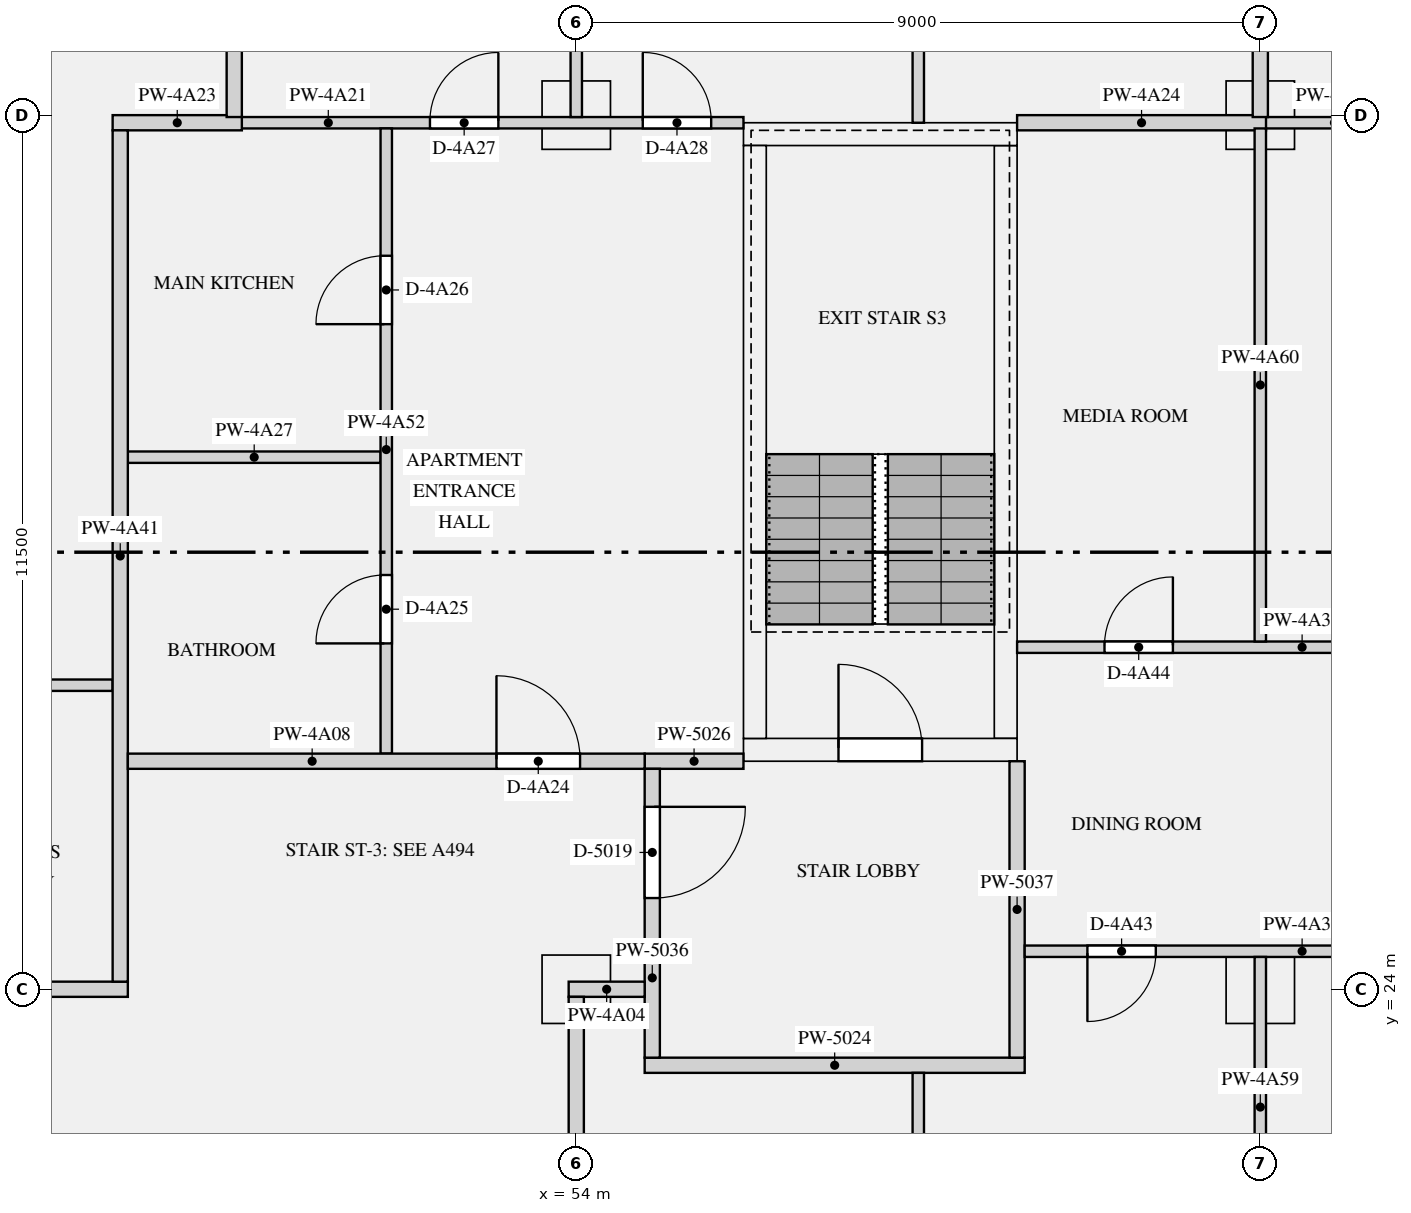
"""IFC4 building model, lengths in metres.
Left out: names, types, materials, properties, quantities, classifications, styles, units other than length and angle.
Written with IfcOpenShell. Run it as: python <this file> out.ifc"""

import sys

from ifc_helpers import new_model, si_unit, direction, frame, frame_2d, origin, origin_2d, place, context, subcontext, project, spatial, rectangle, extrude, element, fill, save


model = new_model("IFC4")
c1 = context("Model", 3, precision=1e-05, world=origin(), true_north=direction((0.0, 1.0)))
c2 = subcontext(c1, "Body", "Model", "MODEL_VIEW")
j1 = project(units=[si_unit("LENGTHUNIT", "METRE"), si_unit("PLANEANGLEUNIT", "RADIAN")], contexts=[c1])
p1 = place(None, origin())
s1 = spatial("IfcSite", under=j1, at=p1, CompositionType="ELEMENT")
p2 = place(p1, origin())
s2 = spatial("IfcBuilding", under=s1, at=p2, CompositionType="ELEMENT")
p3 = place(p2, frame((0.0, 0.0, 198.0)))
s3 = spatial("IfcBuildingStorey", under=s2, at=p3, CompositionType="ELEMENT", Elevation=198.0)
for number, where, z_axis, x_axis in (
    (1, (54.0, 24.0, 0.0), (0.0, 0.0, 1.0), (1.0, 0.0, 0.0)),
    (2, (63.0, 24.0, 0.0), (0.0, 0.0, 1.0), (1.0, 0.0, 0.0)),
    (3, (54.0, 35.5, 0.0), (0.0, 0.0, 1.0), (1.0, 0.0, 0.0)),
    (4, (63.0, 35.5, 0.0), (0.0, 0.0, 1.0), (1.0, 0.0, 0.0)),
):
    element("IfcColumn", number, at=place(p3, frame(where, z_axis=z_axis, x_axis=x_axis)), inside=s3, PredefinedType="COLUMN", context=c2, shape_type="SweptSolid", body=[
        extrude(rectangle(XDim=0.9, YDim=0.9, at=origin_2d()), origin(), (0.0, 0.0, 1.0), 3.15),
    ])
p4 = place(p3, frame((56.2, 27.15, 0.0), z_axis=(0.0, 0.0, 1.0), x_axis=(1.0, 0.0, 0.0)))
e5 = element("IfcWall", 5, at=p4, inside=s3, PredefinedType="SHEAR", context=c2, shape_type="SweptSolid", body=[
    extrude(rectangle(XDim=3.6, YDim=0.3, at=frame_2d((1.8, 0.0))), origin(), (0.0, 0.0, 1.0), 3.15),
])
p5 = place(p4, frame((1.25, 0.0, 0.0)))
e6 = element("IfcOpeningElement", 6, at=p5, cuts=e5, PredefinedType="OPENING", context=c2, shape_type="SweptSolid", body=[
    extrude(rectangle(XDim=1.1, YDim=2.1, at=frame_2d((0.55, 1.05))), frame((0.0, 0.16, 0.0), z_axis=(0.0, -1.0, 0.0), x_axis=(1.0, 0.0, 0.0)), (0.0, 0.0, 1.0), 0.32),
])
p6 = place(p3, frame((56.2, 35.25, 0.0), z_axis=(0.0, 0.0, 1.0), x_axis=(1.0, 0.0, 0.0)))
e7 = element("IfcWall", 7, at=p6, inside=s3, PredefinedType="SHEAR", context=c2, shape_type="SweptSolid", body=[
    extrude(rectangle(XDim=3.6, YDim=0.3, at=frame_2d((1.8, 0.0))), origin(), (0.0, 0.0, 1.0), 3.15),
])
for number, where, z_axis, x_axis in (
    (8, (56.35, 27.3, 0.0), (0.0, 0.0, 1.0), (0.0, 1.0, 0.0)),
    (9, (59.65, 27.3, 0.0), (0.0, 0.0, 1.0), (0.0, 1.0, 0.0)),
):
    element("IfcWall", number, at=place(p3, frame(where, z_axis=z_axis, x_axis=x_axis)), inside=s3, PredefinedType="SHEAR", context=c2, shape_type="SweptSolid", body=[
        extrude(rectangle(XDim=7.8, YDim=0.3, at=frame_2d((3.9, 0.0))), origin(), (0.0, 0.0, 1.0), 3.15),
    ])
p7 = place(p3, frame((54.9, 23.0, 0.0), z_axis=(0.0, 0.0, 1.0), x_axis=(1.0, 0.0, 0.0)))
e10 = element("IfcWall", 10, at=p7, inside=s3, PredefinedType="PARTITIONING", context=c2, shape_type="SweptSolid", body=[
    extrude(rectangle(XDim=5.0, YDim=0.2, at=frame_2d((2.5, 0.0))), origin(), (0.0, 0.0, 1.0), 2.83),
])
p8 = place(p3, frame((54.9, 27.0, 0.0), z_axis=(0.0, 0.0, 1.0), x_axis=(1.0, 0.0, 0.0)))
e11 = element("IfcWall", 11, at=p8, inside=s3, PredefinedType="PARTITIONING", context=c2, shape_type="SweptSolid", body=[
    extrude(rectangle(XDim=1.3, YDim=0.2, at=frame_2d((0.65, 0.0))), origin(), (0.0, 0.0, 1.0), 2.83),
])
p9 = place(p3, frame((55.0, 23.1, 0.0), z_axis=(0.0, 0.0, 1.0), x_axis=(0.0, 1.0, 0.0)))
e12 = element("IfcWall", 12, at=p9, inside=s3, PredefinedType="PARTITIONING", context=c2, shape_type="SweptSolid", body=[
    extrude(rectangle(XDim=3.8, YDim=0.2, at=frame_2d((1.9, 0.0))), origin(), (0.0, 0.0, 1.0), 2.83),
])
p10 = place(p9, frame((2.1, 0.0, 0.0)))
e13 = element("IfcOpeningElement", 13, at=p10, cuts=e12, PredefinedType="OPENING", context=c2, shape_type="SweptSolid", body=[
    extrude(rectangle(XDim=1.2, YDim=2.1, at=frame_2d((0.6, 1.05))), frame((0.0, 0.11, 0.0), z_axis=(0.0, -1.0, 0.0), x_axis=(1.0, 0.0, 0.0)), (0.0, 0.0, 1.0), 0.22),
])
p11 = place(p3, frame((59.8, 23.1, 0.0), z_axis=(0.0, 0.0, 1.0), x_axis=(0.0, 1.0, 0.0)))
e14 = element("IfcWall", 14, at=p11, inside=s3, PredefinedType="PARTITIONING", context=c2, shape_type="SweptSolid", body=[
    extrude(rectangle(XDim=3.9, YDim=0.2, at=frame_2d((1.95, 0.0))), origin(), (0.0, 0.0, 1.0), 2.83),
])
p12 = place(p3, frame((45.0, 24.0, 0.0), z_axis=(0.0, 0.0, 1.0), x_axis=(1.0, 0.0, 0.0)))
e15 = element("IfcWall", 15, at=p12, inside=s3, PredefinedType="PARTITIONING", context=c2, shape_type="SweptSolid", body=[
    extrude(rectangle(XDim=3.1, YDim=0.2, at=frame_2d((1.55, 0.0))), origin(), (0.0, 0.0, 1.0), 2.83),
])
p13 = place(p3, frame((53.9, 24.0, 0.0), z_axis=(0.0, 0.0, 1.0), x_axis=(1.0, 0.0, 0.0)))
e16 = element("IfcWall", 16, at=p13, inside=s3, PredefinedType="PARTITIONING", context=c2, shape_type="SweptSolid", body=[
    extrude(rectangle(XDim=1.0, YDim=0.2, at=frame_2d((0.5, 0.0))), origin(), (0.0, 0.0, 1.0), 2.83),
])
p14 = place(p3, frame((48.1, 27.0, 0.0), z_axis=(0.0, 0.0, 1.0), x_axis=(1.0, 0.0, 0.0)))
e17 = element("IfcWall", 17, at=p14, inside=s3, PredefinedType="PARTITIONING", context=c2, shape_type="SweptSolid", body=[
    extrude(rectangle(XDim=6.8, YDim=0.2, at=frame_2d((3.4, 0.0))), origin(), (0.0, 0.0, 1.0), 2.83),
])
p15 = place(p14, frame((4.85, 0.0, 0.0)))
e18 = element("IfcOpeningElement", 18, at=p15, cuts=e17, PredefinedType="OPENING", context=c2, shape_type="SweptSolid", body=[
    extrude(rectangle(XDim=1.1, YDim=2.1, at=frame_2d((0.55, 1.05))), frame((0.0, 0.11, 0.0), z_axis=(0.0, -1.0, 0.0), x_axis=(1.0, 0.0, 0.0)), (0.0, 0.0, 1.0), 0.22),
])
p16 = place(p3, frame((49.4, 35.4, 0.0), z_axis=(0.0, 0.0, 1.0), x_axis=(1.0, 0.0, 0.0)))
e19 = element("IfcWall", 19, at=p16, inside=s3, PredefinedType="PARTITIONING", context=c2, shape_type="SweptSolid", body=[
    extrude(rectangle(XDim=6.8, YDim=0.15, at=frame_2d((3.4, 0.0))), origin(), (0.0, 0.0, 1.0), 2.83),
])
p17 = place(p16, frame((2.675, 0.0, 0.0)))
e20 = element("IfcOpeningElement", 20, at=p17, cuts=e19, PredefinedType="OPENING", context=c2, shape_type="SweptSolid", body=[
    extrude(rectangle(XDim=0.9, YDim=2.1, at=frame_2d((0.45, 1.05))), frame((0.0, 0.085, 0.0), z_axis=(0.0, -1.0, 0.0), x_axis=(1.0, 0.0, 0.0)), (0.0, 0.0, 1.0), 0.17),
])
p18 = place(p16, frame((5.475, 0.0, 0.0)))
e21 = element("IfcOpeningElement", 21, at=p18, cuts=e19, PredefinedType="OPENING", context=c2, shape_type="SweptSolid", body=[
    extrude(rectangle(XDim=0.9, YDim=2.1, at=frame_2d((0.45, 1.05))), frame((0.0, 0.085, 0.0), z_axis=(0.0, -1.0, 0.0), x_axis=(1.0, 0.0, 0.0)), (0.0, 0.0, 1.0), 0.17),
])
p19 = place(p3, frame((62.925, 35.4, 0.0), z_axis=(0.0, 0.0, 1.0), x_axis=(1.0, 0.0, 0.0)))
e22 = element("IfcWall", 22, at=p19, inside=s3, PredefinedType="PARTITIONING", context=c2, shape_type="SweptSolid", body=[
    extrude(rectangle(XDim=4.65, YDim=0.15, at=frame_2d((2.325, 0.0))), origin(), (0.0, 0.0, 1.0), 2.83),
])
p20 = place(p19, frame((2.1, 0.0, 0.0)))
e23 = element("IfcOpeningElement", 23, at=p20, cuts=e22, PredefinedType="OPENING", context=c2, shape_type="SweptSolid", body=[
    extrude(rectangle(XDim=0.9, YDim=2.1, at=frame_2d((0.45, 1.05))), frame((0.0, 0.085, 0.0), z_axis=(0.0, -1.0, 0.0), x_axis=(1.0, 0.0, 0.0)), (0.0, 0.0, 1.0), 0.17),
])
p21 = place(p3, frame((47.9, 35.4, 0.0), z_axis=(0.0, 0.0, 1.0), x_axis=(1.0, 0.0, 0.0)))
e24 = element("IfcWall", 24, at=p21, inside=s3, PredefinedType="PARTITIONING", context=c2, shape_type="SweptSolid", body=[
    extrude(rectangle(XDim=1.7, YDim=0.2, at=frame_2d((0.85, 0.0))), origin(), (0.0, 0.0, 1.0), 2.83),
])
p22 = place(p3, frame((59.8, 35.4, 0.0), z_axis=(0.0, 0.0, 1.0), x_axis=(1.0, 0.0, 0.0)))
e25 = element("IfcWall", 25, at=p22, inside=s3, PredefinedType="PARTITIONING", context=c2, shape_type="SweptSolid", body=[
    extrude(rectangle(XDim=3.275, YDim=0.2, at=frame_2d((1.637, 0.0))), origin(), (0.0, 0.0, 1.0), 2.83),
])
p23 = place(p3, frame((45.0, 28.0, 0.0), z_axis=(0.0, 0.0, 1.0), x_axis=(1.0, 0.0, 0.0)))
e26 = element("IfcWall", 26, at=p23, inside=s3, PredefinedType="PARTITIONING", context=c2, shape_type="SweptSolid", body=[
    extrude(rectangle(XDim=2.9, YDim=0.15, at=frame_2d((1.45, 0.0))), origin(), (0.0, 0.0, 1.0), 2.83),
])
p24 = place(p23, frame((1.05, 0.0, 0.0)))
e27 = element("IfcOpeningElement", 27, at=p24, cuts=e26, PredefinedType="OPENING", context=c2, shape_type="SweptSolid", body=[
    extrude(rectangle(XDim=0.9, YDim=2.1, at=frame_2d((0.45, 1.05))), frame((0.0, 0.085, 0.0), z_axis=(0.0, -1.0, 0.0), x_axis=(1.0, 0.0, 0.0)), (0.0, 0.0, 1.0), 0.17),
])
p25 = place(p3, frame((48.1, 31.0, 0.0), z_axis=(0.0, 0.0, 1.0), x_axis=(1.0, 0.0, 0.0)))
e28 = element("IfcWall", 28, at=p25, inside=s3, PredefinedType="PARTITIONING", context=c2, shape_type="SweptSolid", body=[
    extrude(rectangle(XDim=3.325, YDim=0.15, at=frame_2d((1.663, 0.0))), origin(), (0.0, 0.0, 1.0), 2.83),
])
p26 = place(p3, frame((59.9, 24.5, 0.0), z_axis=(0.0, 0.0, 1.0), x_axis=(1.0, 0.0, 0.0)))
e29 = element("IfcWall", 29, at=p26, inside=s3, PredefinedType="PARTITIONING", context=c2, shape_type="SweptSolid", body=[
    extrude(rectangle(XDim=8.95, YDim=0.15, at=frame_2d((4.475, 0.0))), origin(), (0.0, 0.0, 1.0), 2.83),
])
p27 = place(p26, frame((5.575, 0.0, 0.0)))
e30 = element("IfcOpeningElement", 30, at=p27, cuts=e29, PredefinedType="OPENING", context=c2, shape_type="SweptSolid", body=[
    extrude(rectangle(XDim=1.5, YDim=2.1, at=frame_2d((0.75, 1.05))), frame((0.0, 0.085, 0.0), z_axis=(0.0, -1.0, 0.0), x_axis=(1.0, 0.0, 0.0)), (0.0, 0.0, 1.0), 0.17),
])
p28 = place(p26, frame((0.825, 0.0, 0.0)))
e31 = element("IfcOpeningElement", 31, at=p28, cuts=e29, PredefinedType="OPENING", context=c2, shape_type="SweptSolid", body=[
    extrude(rectangle(XDim=0.9, YDim=2.1, at=frame_2d((0.45, 1.05))), frame((0.0, 0.085, 0.0), z_axis=(0.0, -1.0, 0.0), x_axis=(1.0, 0.0, 0.0)), (0.0, 0.0, 1.0), 0.17),
])
p29 = place(p3, frame((59.8, 28.5, 0.0), z_axis=(0.0, 0.0, 1.0), x_axis=(1.0, 0.0, 0.0)))
e32 = element("IfcWall", 32, at=p29, inside=s3, PredefinedType="PARTITIONING", context=c2, shape_type="SweptSolid", body=[
    extrude(rectangle(XDim=9.05, YDim=0.15, at=frame_2d((4.525, 0.0))), origin(), (0.0, 0.0, 1.0), 2.83),
])
p30 = place(p29, frame((1.15, 0.0, 0.0)))
e33 = element("IfcOpeningElement", 33, at=p30, cuts=e32, PredefinedType="OPENING", context=c2, shape_type="SweptSolid", body=[
    extrude(rectangle(XDim=0.9, YDim=2.1, at=frame_2d((0.45, 1.05))), frame((0.0, 0.085, 0.0), z_axis=(0.0, -1.0, 0.0), x_axis=(1.0, 0.0, 0.0)), (0.0, 0.0, 1.0), 0.17),
])
p31 = place(p29, frame((5.45, 0.0, 0.0)))
e34 = element("IfcOpeningElement", 34, at=p31, cuts=e32, PredefinedType="OPENING", context=c2, shape_type="SweptSolid", body=[
    extrude(rectangle(XDim=1.5, YDim=2.1, at=frame_2d((0.75, 1.05))), frame((0.0, 0.085, 0.0), z_axis=(0.0, -1.0, 0.0), x_axis=(1.0, 0.0, 0.0)), (0.0, 0.0, 1.0), 0.17),
])
p32 = place(p3, frame((54.0, 35.475, 0.0), z_axis=(0.0, 0.0, 1.0), x_axis=(0.0, 1.0, 0.0)))
e35 = element("IfcWall", 35, at=p32, inside=s3, PredefinedType="PARTITIONING", context=c2, shape_type="SweptSolid", body=[
    extrude(rectangle(XDim=5.375, YDim=0.15, at=frame_2d((2.688, 0.0))), origin(), (0.0, 0.0, 1.0), 2.83),
])
p33 = place(p3, frame((54.0, 16.1, 0.0), z_axis=(0.0, 0.0, 1.0), x_axis=(0.0, 1.0, 0.0)))
e36 = element("IfcWall", 36, at=p33, inside=s3, PredefinedType="PARTITIONING", context=c2, shape_type="SweptSolid", body=[
    extrude(rectangle(XDim=7.8, YDim=0.2, at=frame_2d((3.9, 0.0))), origin(), (0.0, 0.0, 1.0), 2.83),
])
p34 = place(p33, frame((1.85, 0.0, 0.0)))
e37 = element("IfcOpeningElement", 37, at=p34, cuts=e36, PredefinedType="OPENING", context=c2, shape_type="SweptSolid", body=[
    extrude(rectangle(XDim=1.1, YDim=2.1, at=frame_2d((0.55, 1.05))), frame((0.0, 0.11, 0.0), z_axis=(0.0, -1.0, 0.0), x_axis=(1.0, 0.0, 0.0)), (0.0, 0.0, 1.0), 0.22),
])
p35 = place(p3, frame((48.0, 24.1, 0.0), z_axis=(0.0, 0.0, 1.0), x_axis=(0.0, 1.0, 0.0)))
e38 = element("IfcWall", 38, at=p35, inside=s3, PredefinedType="PARTITIONING", context=c2, shape_type="SweptSolid", body=[
    extrude(rectangle(XDim=11.2, YDim=0.2, at=frame_2d((5.6, 0.0))), origin(), (0.0, 0.0, 1.0), 2.83),
])
p36 = place(p3, frame((49.5, 35.475, 0.0), z_axis=(0.0, 0.0, 1.0), x_axis=(0.0, 1.0, 0.0)))
e39 = element("IfcWall", 39, at=p36, inside=s3, PredefinedType="PARTITIONING", context=c2, shape_type="SweptSolid", body=[
    extrude(rectangle(XDim=5.375, YDim=0.2, at=frame_2d((2.688, 0.0))), origin(), (0.0, 0.0, 1.0), 2.83),
])
p37 = place(p3, frame((51.5, 27.1, 0.0), z_axis=(0.0, 0.0, 1.0), x_axis=(0.0, 1.0, 0.0)))
e40 = element("IfcWall", 40, at=p37, inside=s3, PredefinedType="PARTITIONING", context=c2, shape_type="SweptSolid", body=[
    extrude(rectangle(XDim=8.225, YDim=0.15, at=frame_2d((4.112, 0.0))), origin(), (0.0, 0.0, 1.0), 2.83),
])
p38 = place(p37, frame((1.45, 0.0, 0.0)))
e41 = element("IfcOpeningElement", 41, at=p38, cuts=e40, PredefinedType="OPENING", context=c2, shape_type="SweptSolid", body=[
    extrude(rectangle(XDim=0.9, YDim=2.1, at=frame_2d((0.45, 1.05))), frame((0.0, 0.085, 0.0), z_axis=(0.0, -1.0, 0.0), x_axis=(1.0, 0.0, 0.0)), (0.0, 0.0, 1.0), 0.17),
])
p39 = place(p37, frame((5.65, 0.0, 0.0)))
e42 = element("IfcOpeningElement", 42, at=p39, cuts=e40, PredefinedType="OPENING", context=c2, shape_type="SweptSolid", body=[
    extrude(rectangle(XDim=0.9, YDim=2.1, at=frame_2d((0.45, 1.05))), frame((0.0, 0.085, 0.0), z_axis=(0.0, -1.0, 0.0), x_axis=(1.0, 0.0, 0.0)), (0.0, 0.0, 1.0), 0.17),
])
p40 = place(p3, frame((58.5, 16.575, 0.0), z_axis=(0.0, 0.0, 1.0), x_axis=(0.0, 1.0, 0.0)))
e43 = element("IfcWall", 43, at=p40, inside=s3, PredefinedType="PARTITIONING", context=c2, shape_type="SweptSolid", body=[
    extrude(rectangle(XDim=6.325, YDim=0.15, at=frame_2d((3.163, 0.0))), origin(), (0.0, 0.0, 1.0), 2.83),
])
p41 = place(p40, frame((2.75, 0.0, 0.0)))
e44 = element("IfcOpeningElement", 44, at=p41, cuts=e43, PredefinedType="OPENING", context=c2, shape_type="SweptSolid", body=[
    extrude(rectangle(XDim=0.9, YDim=2.1, at=frame_2d((0.45, 1.05))), frame((0.0, 0.085, 0.0), z_axis=(0.0, -1.0, 0.0), x_axis=(1.0, 0.0, 0.0)), (0.0, 0.0, 1.0), 0.17),
])
p42 = place(p3, frame((58.5, 35.4, 0.0), z_axis=(0.0, 0.0, 1.0), x_axis=(0.0, 1.0, 0.0)))
e45 = element("IfcWall", 45, at=p42, inside=s3, PredefinedType="PARTITIONING", context=c2, shape_type="SweptSolid", body=[
    extrude(rectangle(XDim=5.45, YDim=0.15, at=frame_2d((2.725, 0.0))), origin(), (0.0, 0.0, 1.0), 2.83),
])
p43 = place(p42, frame((1.3, 0.0, 0.0)))
e46 = element("IfcOpeningElement", 46, at=p43, cuts=e45, PredefinedType="OPENING", context=c2, shape_type="SweptSolid", body=[
    extrude(rectangle(XDim=0.9, YDim=2.1, at=frame_2d((0.45, 1.05))), frame((0.0, 0.085, 0.0), z_axis=(0.0, -1.0, 0.0), x_axis=(1.0, 0.0, 0.0)), (0.0, 0.0, 1.0), 0.17),
])
p44 = place(p42, frame((4.1, 0.0, 0.0)))
e47 = element("IfcOpeningElement", 47, at=p44, cuts=e45, PredefinedType="OPENING", context=c2, shape_type="SweptSolid", body=[
    extrude(rectangle(XDim=0.9, YDim=2.1, at=frame_2d((0.45, 1.05))), frame((0.0, 0.085, 0.0), z_axis=(0.0, -1.0, 0.0), x_axis=(1.0, 0.0, 0.0)), (0.0, 0.0, 1.0), 0.17),
])
p45 = place(p3, frame((63.0, 16.575, 0.0), z_axis=(0.0, 0.0, 1.0), x_axis=(0.0, 1.0, 0.0)))
e48 = element("IfcWall", 48, at=p45, inside=s3, PredefinedType="PARTITIONING", context=c2, shape_type="SweptSolid", body=[
    extrude(rectangle(XDim=7.85, YDim=0.15, at=frame_2d((3.925, 0.0))), origin(), (0.0, 0.0, 1.0), 2.83),
])
p46 = place(p45, frame((3.0, 0.0, 0.0)))
e49 = element("IfcOpeningElement", 49, at=p46, cuts=e48, PredefinedType="OPENING", context=c2, shape_type="SweptSolid", body=[
    extrude(rectangle(XDim=0.9, YDim=2.1, at=frame_2d((0.45, 1.05))), frame((0.0, 0.085, 0.0), z_axis=(0.0, -1.0, 0.0), x_axis=(1.0, 0.0, 0.0)), (0.0, 0.0, 1.0), 0.17),
])
p47 = place(p3, frame((63.0, 28.575, 0.0), z_axis=(0.0, 0.0, 1.0), x_axis=(0.0, 1.0, 0.0)))
e50 = element("IfcWall", 50, at=p47, inside=s3, PredefinedType="PARTITIONING", context=c2, shape_type="SweptSolid", body=[
    extrude(rectangle(XDim=6.75, YDim=0.15, at=frame_2d((3.375, 0.0))), origin(), (0.0, 0.0, 1.0), 2.83),
])
p48 = place(p3, frame((63.0, 35.475, 0.0), z_axis=(0.0, 0.0, 1.0), x_axis=(0.0, 1.0, 0.0)))
e51 = element("IfcWall", 51, at=p48, inside=s3, PredefinedType="PARTITIONING", context=c2, shape_type="SweptSolid", body=[
    extrude(rectangle(XDim=5.375, YDim=0.2, at=frame_2d((2.688, 0.0))), origin(), (0.0, 0.0, 1.0), 2.83),
])
p49 = place(p5, origin())
e52 = element("IfcDoor", 52, at=p49, inside=s3, OperationType="SINGLE_SWING_LEFT", PredefinedType="DOOR", context=c2, shape_type="SweptSolid", body=[
    extrude(rectangle(XDim=1.1, YDim=2.1, at=frame_2d((0.55, 1.05))), frame((0.0, 0.025, 0.0), z_axis=(0.0, -1.0, 0.0), x_axis=(1.0, 0.0, 0.0)), (0.0, 0.0, 1.0), 0.05),
])
fill(e6, e52)
p50 = place(p10, frame((1.2, 0.0, 0.0), z_axis=(0.0, 0.0, 1.0), x_axis=(-1.0, 0.0, 0.0)))
e53 = element("IfcDoor", 53, at=p50, inside=s3, OperationType="SINGLE_SWING_LEFT", PredefinedType="DOOR", context=c2, shape_type="SweptSolid", body=[
    extrude(rectangle(XDim=1.2, YDim=2.1, at=frame_2d((0.6, 1.05))), frame((0.0, 0.025, 0.0), z_axis=(0.0, -1.0, 0.0), x_axis=(1.0, 0.0, 0.0)), (0.0, 0.0, 1.0), 0.05),
])
fill(e13, e53)
p51 = place(p15, origin())
e54 = element("IfcDoor", 54, at=p51, inside=s3, OperationType="SINGLE_SWING_LEFT", PredefinedType="DOOR", context=c2, shape_type="SweptSolid", body=[
    extrude(rectangle(XDim=1.1, YDim=2.1, at=frame_2d((0.55, 1.05))), frame((0.0, 0.025, 0.0), z_axis=(0.0, -1.0, 0.0), x_axis=(1.0, 0.0, 0.0)), (0.0, 0.0, 1.0), 0.05),
])
fill(e18, e54)
p52 = place(p38, origin())
e55 = element("IfcDoor", 55, at=p52, inside=s3, OperationType="SINGLE_SWING_LEFT", PredefinedType="DOOR", context=c2, shape_type="SweptSolid", body=[
    extrude(rectangle(XDim=0.9, YDim=2.1, at=frame_2d((0.45, 1.05))), frame((0.0, 0.025, 0.0), z_axis=(0.0, -1.0, 0.0), x_axis=(1.0, 0.0, 0.0)), (0.0, 0.0, 1.0), 0.05),
])
fill(e41, e55)
p53 = place(p39, origin())
e56 = element("IfcDoor", 56, at=p53, inside=s3, OperationType="SINGLE_SWING_LEFT", PredefinedType="DOOR", context=c2, shape_type="SweptSolid", body=[
    extrude(rectangle(XDim=0.9, YDim=2.1, at=frame_2d((0.45, 1.05))), frame((0.0, 0.025, 0.0), z_axis=(0.0, -1.0, 0.0), x_axis=(1.0, 0.0, 0.0)), (0.0, 0.0, 1.0), 0.05),
])
fill(e42, e56)
p54 = place(p17, origin())
e57 = element("IfcDoor", 57, at=p54, inside=s3, OperationType="SINGLE_SWING_RIGHT", PredefinedType="DOOR", context=c2, shape_type="SweptSolid", body=[
    extrude(rectangle(XDim=0.9, YDim=2.1, at=frame_2d((0.45, 1.05))), frame((0.0, 0.025, 0.0), z_axis=(0.0, -1.0, 0.0), x_axis=(1.0, 0.0, 0.0)), (0.0, 0.0, 1.0), 0.05),
])
fill(e20, e57)
p55 = place(p18, origin())
e58 = element("IfcDoor", 58, at=p55, inside=s3, OperationType="SINGLE_SWING_LEFT", PredefinedType="DOOR", context=c2, shape_type="SweptSolid", body=[
    extrude(rectangle(XDim=0.9, YDim=2.1, at=frame_2d((0.45, 1.05))), frame((0.0, 0.025, 0.0), z_axis=(0.0, -1.0, 0.0), x_axis=(1.0, 0.0, 0.0)), (0.0, 0.0, 1.0), 0.05),
])
fill(e21, e58)
p56 = place(p28, frame((0.9, 0.0, 0.0), z_axis=(0.0, 0.0, 1.0), x_axis=(-1.0, 0.0, 0.0)))
e59 = element("IfcDoor", 59, at=p56, inside=s3, OperationType="SINGLE_SWING_RIGHT", PredefinedType="DOOR", context=c2, shape_type="SweptSolid", body=[
    extrude(rectangle(XDim=0.9, YDim=2.1, at=frame_2d((0.45, 1.05))), frame((0.0, 0.025, 0.0), z_axis=(0.0, -1.0, 0.0), x_axis=(1.0, 0.0, 0.0)), (0.0, 0.0, 1.0), 0.05),
])
fill(e31, e59)
p57 = place(p30, origin())
e60 = element("IfcDoor", 60, at=p57, inside=s3, OperationType="SINGLE_SWING_RIGHT", PredefinedType="DOOR", context=c2, shape_type="SweptSolid", body=[
    extrude(rectangle(XDim=0.9, YDim=2.1, at=frame_2d((0.45, 1.05))), frame((0.0, 0.025, 0.0), z_axis=(0.0, -1.0, 0.0), x_axis=(1.0, 0.0, 0.0)), (0.0, 0.0, 1.0), 0.05),
])
fill(e33, e60)
save(model, sys.argv[1])
